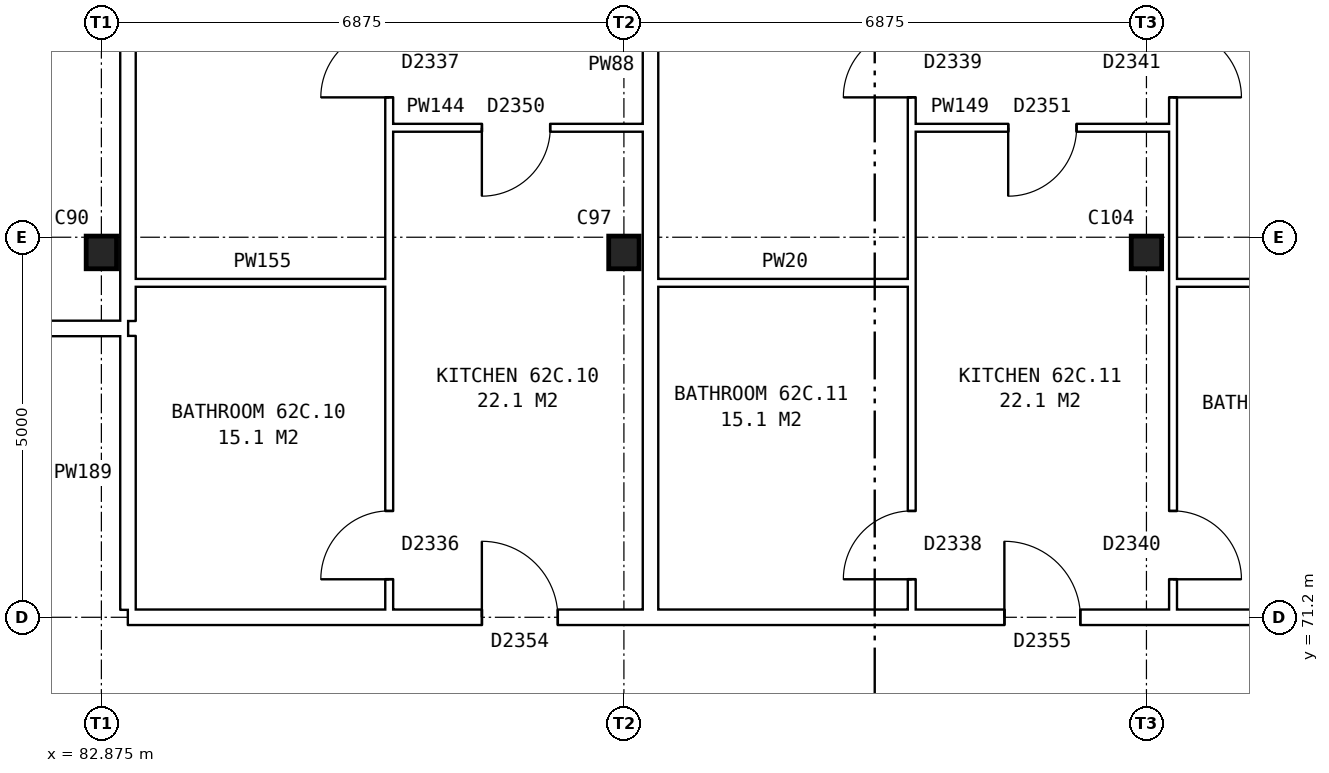
"""IFC4 building model, lengths in metres.
Left out: names, types, materials, properties, quantities, classifications, styles, units other than length and angle.
Written with IfcOpenShell. Run it as: python <this file> out.ifc"""

import sys

from ifc_helpers import new_model, si_unit, direction, frame, frame_2d, origin, origin_2d, place, context, subcontext, project, spatial, rectangle, i_section, extrude, element, fill, save


model = new_model("IFC4")
c1 = context("Model", 3, precision=1e-05, world=origin(), true_north=direction((0.0, 1.0)))
c2 = subcontext(c1, "Body", "Model", "MODEL_VIEW")
j1 = project(units=[si_unit("LENGTHUNIT", "METRE"), si_unit("PLANEANGLEUNIT", "RADIAN")], contexts=[c1])
p1 = place(None, origin())
s1 = spatial("IfcSite", under=j1, at=p1, CompositionType="ELEMENT")
p2 = place(p1, origin())
s2 = spatial("IfcBuilding", under=s1, at=p2, CompositionType="ELEMENT")
p3 = place(p2, frame((0.0, 0.0, 221.4)))
s3 = spatial("IfcBuildingStorey", under=s2, at=p3, CompositionType="ELEMENT", Elevation=221.4)
for number, where, z_axis, x_axis in (
    (1, (82.875, 76.0, 0.0), (0.0, 0.0, 1.0), (1.0, 0.0, 0.0)),
    (2, (89.75, 76.0, 0.0), (0.0, 0.0, 1.0), (1.0, 0.0, 0.0)),
    (3, (96.625, 76.0, 0.0), (0.0, 0.0, 1.0), (1.0, 0.0, 0.0)),
):
    element("IfcColumn", number, at=place(p3, frame(where, z_axis=z_axis, x_axis=x_axis)), inside=s3, PredefinedType="COLUMN", context=c2, shape_type="SweptSolid", body=[
        extrude(i_section(OverallWidth=0.4, OverallDepth=0.43, WebThickness=0.04, FlangeThickness=0.04, at=origin_2d()), origin(), (0.0, 0.0, 1.0), 2.85),
    ])
p4 = place(p3, frame((83.225, 71.2, 0.0), z_axis=(0.0, 0.0, 1.0), x_axis=(1.0, 0.0, 0.0)))
e4 = element("IfcWall", 4, at=p4, inside=s3, PredefinedType="PARTITIONING", context=c2, shape_type="SweptSolid", body=[
    extrude(rectangle(XDim=41.25, YDim=0.2, at=frame_2d((20.625, 0.0))), origin(), (0.0, 0.0, 1.0), 2.85),
])
p5 = place(p4, frame((4.656, 0.0, 0.0)))
e5 = element("IfcOpeningElement", 5, at=p5, cuts=e4, PredefinedType="OPENING", context=c2, shape_type="SweptSolid", body=[
    extrude(rectangle(XDim=1.0, YDim=2.1, at=frame_2d((0.5, 1.05))), frame((0.0, 0.11, 0.0), z_axis=(0.0, -1.0, 0.0), x_axis=(1.0, 0.0, 0.0)), (0.0, 0.0, 1.0), 0.22),
])
p6 = place(p4, frame((11.531, 0.0, 0.0)))
e6 = element("IfcOpeningElement", 6, at=p6, cuts=e4, PredefinedType="OPENING", context=c2, shape_type="SweptSolid", body=[
    extrude(rectangle(XDim=1.0, YDim=2.1, at=frame_2d((0.5, 1.05))), frame((0.0, 0.11, 0.0), z_axis=(0.0, -1.0, 0.0), x_axis=(1.0, 0.0, 0.0)), (0.0, 0.0, 1.0), 0.22),
])
p7 = place(p4, frame((18.406, 0.0, 0.0)))
e7 = element("IfcOpeningElement", 7, at=p7, cuts=e4, PredefinedType="OPENING", context=c2, shape_type="SweptSolid", body=[
    extrude(rectangle(XDim=1.0, YDim=2.1, at=frame_2d((0.5, 1.05))), frame((0.0, 0.11, 0.0), z_axis=(0.0, -1.0, 0.0), x_axis=(1.0, 0.0, 0.0)), (0.0, 0.0, 1.0), 0.22),
])
p8 = place(p4, frame((28.719, 0.0, 0.0)))
e8 = element("IfcOpeningElement", 8, at=p8, cuts=e4, PredefinedType="OPENING", context=c2, shape_type="SweptSolid", body=[
    extrude(rectangle(XDim=1.0, YDim=2.1, at=frame_2d((0.5, 1.05))), frame((0.0, 0.11, 0.0), z_axis=(0.0, -1.0, 0.0), x_axis=(1.0, 0.0, 0.0)), (0.0, 0.0, 1.0), 0.22),
])
p9 = place(p4, frame((35.594, 0.0, 0.0)))
e9 = element("IfcOpeningElement", 9, at=p9, cuts=e4, PredefinedType="OPENING", context=c2, shape_type="SweptSolid", body=[
    extrude(rectangle(XDim=1.0, YDim=2.1, at=frame_2d((0.5, 1.05))), frame((0.0, 0.11, 0.0), z_axis=(0.0, -1.0, 0.0), x_axis=(1.0, 0.0, 0.0)), (0.0, 0.0, 1.0), 0.22),
])
p10 = place(p3, frame((75.64, 75.0, 0.0), z_axis=(0.0, 0.0, 1.0), x_axis=(1.0, 0.0, 0.0)))
e10 = element("IfcWall", 10, at=p10, inside=s3, PredefinedType="PARTITIONING", context=c2, shape_type="SweptSolid", body=[
    extrude(rectangle(XDim=7.585, YDim=0.2, at=frame_2d((3.792, 0.0))), origin(), (0.0, 0.0, 1.0), 2.85),
])
p11 = place(p10, frame((3.343, 0.0, 0.0)))
e11 = element("IfcOpeningElement", 11, at=p11, cuts=e10, PredefinedType="OPENING", context=c2, shape_type="SweptSolid", body=[
    extrude(rectangle(XDim=0.9, YDim=2.1, at=frame_2d((0.45, 1.05))), frame((0.0, 0.11, 0.0), z_axis=(0.0, -1.0, 0.0), x_axis=(1.0, 0.0, 0.0)), (0.0, 0.0, 1.0), 0.22),
])
for number, where, z_axis, x_axis in (
    (12, (83.325, 75.6, 0.0), (0.0, 0.0, 1.0), (1.0, 0.0, 0.0)),
    (13, (90.2, 75.6, 0.0), (0.0, 0.0, 1.0), (1.0, 0.0, 0.0)),
):
    element("IfcWall", number, at=place(p3, frame(where, z_axis=z_axis, x_axis=x_axis)), inside=s3, PredefinedType="PARTITIONING", context=c2, shape_type="SweptSolid", body=[
        extrude(rectangle(XDim=3.337, YDim=0.1, at=frame_2d((1.668, 0.0))), origin(), (0.0, 0.0, 1.0), 2.85),
    ])
p12 = place(p3, frame((96.975, 75.6, 0.0), z_axis=(0.0, 0.0, 1.0), x_axis=(1.0, 0.0, 0.0)))
e14 = element("IfcWall", 14, at=p12, inside=s3, PredefinedType="PARTITIONING", context=c2, shape_type="SweptSolid", body=[
    extrude(rectangle(XDim=3.337, YDim=0.1, at=frame_2d((1.668, 0.0))), origin(), (0.0, 0.0, 1.0), 2.85),
])
p13 = place(p3, frame((86.662, 77.64, 0.0), z_axis=(0.0, 0.0, 1.0), x_axis=(1.0, 0.0, 0.0)))
e15 = element("IfcWall", 15, at=p13, inside=s3, PredefinedType="PARTITIONING", context=c2, shape_type="SweptSolid", body=[
    extrude(rectangle(XDim=3.338, YDim=0.1, at=frame_2d((1.669, 0.0))), origin(), (0.0, 0.0, 1.0), 2.85),
])
p14 = place(p13, frame((1.219, 0.0, 0.0)))
e16 = element("IfcOpeningElement", 16, at=p14, cuts=e15, PredefinedType="OPENING", context=c2, shape_type="SweptSolid", body=[
    extrude(rectangle(XDim=0.9, YDim=2.1, at=frame_2d((0.45, 1.05))), frame((0.0, 0.06, 0.0), z_axis=(0.0, -1.0, 0.0), x_axis=(1.0, 0.0, 0.0)), (0.0, 0.0, 1.0), 0.12),
])
p15 = place(p3, frame((93.537, 77.64, 0.0), z_axis=(0.0, 0.0, 1.0), x_axis=(1.0, 0.0, 0.0)))
e17 = element("IfcWall", 17, at=p15, inside=s3, PredefinedType="PARTITIONING", context=c2, shape_type="SweptSolid", body=[
    extrude(rectangle(XDim=3.438, YDim=0.1, at=frame_2d((1.719, 0.0))), origin(), (0.0, 0.0, 1.0), 2.85),
])
p16 = place(p15, frame((1.269, 0.0, 0.0)))
e18 = element("IfcOpeningElement", 18, at=p16, cuts=e17, PredefinedType="OPENING", context=c2, shape_type="SweptSolid", body=[
    extrude(rectangle(XDim=0.9, YDim=2.1, at=frame_2d((0.45, 1.05))), frame((0.0, 0.06, 0.0), z_axis=(0.0, -1.0, 0.0), x_axis=(1.0, 0.0, 0.0)), (0.0, 0.0, 1.0), 0.12),
])
p17 = place(p3, frame((83.225, 71.3, 0.0), z_axis=(0.0, 0.0, 1.0), x_axis=(0.0, 1.0, 0.0)))
e19 = element("IfcWall", 19, at=p17, inside=s3, PredefinedType="PARTITIONING", context=c2, shape_type="SweptSolid", body=[
    extrude(rectangle(XDim=3.6, YDim=0.2, at=frame_2d((1.8, 0.0))), origin(), (0.0, 0.0, 1.0), 2.85),
])
p18 = place(p3, frame((83.225, 75.1, 0.0), z_axis=(0.0, 0.0, 1.0), x_axis=(0.0, 1.0, 0.0)))
e20 = element("IfcWall", 20, at=p18, inside=s3, PredefinedType="PARTITIONING", context=c2, shape_type="SweptSolid", body=[
    extrude(rectangle(XDim=10.54, YDim=0.2, at=frame_2d((5.27, 0.0))), origin(), (0.0, 0.0, 1.0), 2.85),
])
p19 = place(p3, frame((86.662, 71.3, 0.0), z_axis=(0.0, 0.0, 1.0), x_axis=(0.0, 1.0, 0.0)))
e21 = element("IfcWall", 21, at=p19, inside=s3, PredefinedType="PARTITIONING", context=c2, shape_type="SweptSolid", body=[
    extrude(rectangle(XDim=14.34, YDim=0.1, at=frame_2d((7.17, 0.0))), origin(), (0.0, 0.0, 1.0), 2.85),
])
p20 = place(p19, frame((6.74, 0.0, 0.0)))
e22 = element("IfcOpeningElement", 22, at=p20, cuts=e21, PredefinedType="OPENING", context=c2, shape_type="SweptSolid", body=[
    extrude(rectangle(XDim=0.9, YDim=2.1, at=frame_2d((0.45, 1.05))), frame((0.0, 0.06, 0.0), z_axis=(0.0, -1.0, 0.0), x_axis=(1.0, 0.0, 0.0)), (0.0, 0.0, 1.0), 0.12),
])
p21 = place(p19, frame((0.4, 0.0, 0.0)))
e23 = element("IfcOpeningElement", 23, at=p21, cuts=e21, PredefinedType="OPENING", context=c2, shape_type="SweptSolid", body=[
    extrude(rectangle(XDim=0.9, YDim=2.1, at=frame_2d((0.45, 1.05))), frame((0.0, 0.06, 0.0), z_axis=(0.0, -1.0, 0.0), x_axis=(1.0, 0.0, 0.0)), (0.0, 0.0, 1.0), 0.12),
])
p22 = place(p3, frame((90.1, 71.3, 0.0), z_axis=(0.0, 0.0, 1.0), x_axis=(0.0, 1.0, 0.0)))
e24 = element("IfcWall", 24, at=p22, inside=s3, PredefinedType="PARTITIONING", context=c2, shape_type="SweptSolid", body=[
    extrude(rectangle(XDim=14.34, YDim=0.2, at=frame_2d((7.17, 0.0))), origin(), (0.0, 0.0, 1.0), 2.85),
])
p23 = place(p3, frame((93.537, 71.3, 0.0), z_axis=(0.0, 0.0, 1.0), x_axis=(0.0, 1.0, 0.0)))
e25 = element("IfcWall", 25, at=p23, inside=s3, PredefinedType="PARTITIONING", context=c2, shape_type="SweptSolid", body=[
    extrude(rectangle(XDim=14.34, YDim=0.1, at=frame_2d((7.17, 0.0))), origin(), (0.0, 0.0, 1.0), 2.85),
])
p24 = place(p23, frame((6.74, 0.0, 0.0)))
e26 = element("IfcOpeningElement", 26, at=p24, cuts=e25, PredefinedType="OPENING", context=c2, shape_type="SweptSolid", body=[
    extrude(rectangle(XDim=0.9, YDim=2.1, at=frame_2d((0.45, 1.05))), frame((0.0, 0.06, 0.0), z_axis=(0.0, -1.0, 0.0), x_axis=(1.0, 0.0, 0.0)), (0.0, 0.0, 1.0), 0.12),
])
p25 = place(p23, frame((0.4, 0.0, 0.0)))
e27 = element("IfcOpeningElement", 27, at=p25, cuts=e25, PredefinedType="OPENING", context=c2, shape_type="SweptSolid", body=[
    extrude(rectangle(XDim=0.9, YDim=2.1, at=frame_2d((0.45, 1.05))), frame((0.0, 0.06, 0.0), z_axis=(0.0, -1.0, 0.0), x_axis=(1.0, 0.0, 0.0)), (0.0, 0.0, 1.0), 0.12),
])
p26 = place(p3, frame((96.975, 71.3, 0.0), z_axis=(0.0, 0.0, 1.0), x_axis=(0.0, 1.0, 0.0)))
e28 = element("IfcWall", 28, at=p26, inside=s3, PredefinedType="PARTITIONING", context=c2, shape_type="SweptSolid", body=[
    extrude(rectangle(XDim=14.34, YDim=0.1, at=frame_2d((7.17, 0.0))), origin(), (0.0, 0.0, 1.0), 2.85),
])
p27 = place(p26, frame((6.74, 0.0, 0.0)))
e29 = element("IfcOpeningElement", 29, at=p27, cuts=e28, PredefinedType="OPENING", context=c2, shape_type="SweptSolid", body=[
    extrude(rectangle(XDim=0.9, YDim=2.1, at=frame_2d((0.45, 1.05))), frame((0.0, 0.06, 0.0), z_axis=(0.0, -1.0, 0.0), x_axis=(1.0, 0.0, 0.0)), (0.0, 0.0, 1.0), 0.12),
])
p28 = place(p26, frame((0.4, 0.0, 0.0)))
e30 = element("IfcOpeningElement", 30, at=p28, cuts=e28, PredefinedType="OPENING", context=c2, shape_type="SweptSolid", body=[
    extrude(rectangle(XDim=0.9, YDim=2.1, at=frame_2d((0.45, 1.05))), frame((0.0, 0.06, 0.0), z_axis=(0.0, -1.0, 0.0), x_axis=(1.0, 0.0, 0.0)), (0.0, 0.0, 1.0), 0.12),
])
p29 = place(p20, origin())
e31 = element("IfcDoor", 31, at=p29, inside=s3, OperationType="SINGLE_SWING_LEFT", PredefinedType="DOOR", context=c2, shape_type="SweptSolid", body=[
    extrude(rectangle(XDim=0.9, YDim=2.1, at=frame_2d((0.45, 1.05))), frame((0.0, 0.025, 0.0), z_axis=(0.0, -1.0, 0.0), x_axis=(1.0, 0.0, 0.0)), (0.0, 0.0, 1.0), 0.05),
])
fill(e22, e31)
p30 = place(p5, origin())
e32 = element("IfcDoor", 32, at=p30, inside=s3, OperationType="SINGLE_SWING_LEFT", PredefinedType="DOOR", context=c2, shape_type="SweptSolid", body=[
    extrude(rectangle(XDim=1.0, YDim=2.1, at=frame_2d((0.5, 1.05))), frame((0.0, 0.025, 0.0), z_axis=(0.0, -1.0, 0.0), x_axis=(1.0, 0.0, 0.0)), (0.0, 0.0, 1.0), 0.05),
])
fill(e5, e32)
p31 = place(p14, frame((0.9, 0.0, 0.0), z_axis=(0.0, 0.0, 1.0), x_axis=(-1.0, 0.0, 0.0)))
e33 = element("IfcDoor", 33, at=p31, inside=s3, OperationType="SINGLE_SWING_RIGHT", PredefinedType="DOOR", context=c2, shape_type="SweptSolid", body=[
    extrude(rectangle(XDim=0.9, YDim=2.1, at=frame_2d((0.45, 1.05))), frame((0.0, 0.025, 0.0), z_axis=(0.0, -1.0, 0.0), x_axis=(1.0, 0.0, 0.0)), (0.0, 0.0, 1.0), 0.05),
])
fill(e16, e33)
p32 = place(p21, origin())
e34 = element("IfcDoor", 34, at=p32, inside=s3, OperationType="SINGLE_SWING_LEFT", PredefinedType="DOOR", context=c2, shape_type="SweptSolid", body=[
    extrude(rectangle(XDim=0.9, YDim=2.1, at=frame_2d((0.45, 1.05))), frame((0.0, 0.025, 0.0), z_axis=(0.0, -1.0, 0.0), x_axis=(1.0, 0.0, 0.0)), (0.0, 0.0, 1.0), 0.05),
])
fill(e23, e34)
p33 = place(p24, origin())
e35 = element("IfcDoor", 35, at=p33, inside=s3, OperationType="SINGLE_SWING_LEFT", PredefinedType="DOOR", context=c2, shape_type="SweptSolid", body=[
    extrude(rectangle(XDim=0.9, YDim=2.1, at=frame_2d((0.45, 1.05))), frame((0.0, 0.025, 0.0), z_axis=(0.0, -1.0, 0.0), x_axis=(1.0, 0.0, 0.0)), (0.0, 0.0, 1.0), 0.05),
])
fill(e26, e35)
p34 = place(p27, frame((0.9, 0.0, 0.0), z_axis=(0.0, 0.0, 1.0), x_axis=(-1.0, 0.0, 0.0)))
e36 = element("IfcDoor", 36, at=p34, inside=s3, OperationType="SINGLE_SWING_RIGHT", PredefinedType="DOOR", context=c2, shape_type="SweptSolid", body=[
    extrude(rectangle(XDim=0.9, YDim=2.1, at=frame_2d((0.45, 1.05))), frame((0.0, 0.025, 0.0), z_axis=(0.0, -1.0, 0.0), x_axis=(1.0, 0.0, 0.0)), (0.0, 0.0, 1.0), 0.05),
])
fill(e29, e36)
p35 = place(p6, origin())
e37 = element("IfcDoor", 37, at=p35, inside=s3, OperationType="SINGLE_SWING_LEFT", PredefinedType="DOOR", context=c2, shape_type="SweptSolid", body=[
    extrude(rectangle(XDim=1.0, YDim=2.1, at=frame_2d((0.5, 1.05))), frame((0.0, 0.025, 0.0), z_axis=(0.0, -1.0, 0.0), x_axis=(1.0, 0.0, 0.0)), (0.0, 0.0, 1.0), 0.05),
])
fill(e6, e37)
p36 = place(p16, frame((0.9, 0.0, 0.0), z_axis=(0.0, 0.0, 1.0), x_axis=(-1.0, 0.0, 0.0)))
e38 = element("IfcDoor", 38, at=p36, inside=s3, OperationType="SINGLE_SWING_RIGHT", PredefinedType="DOOR", context=c2, shape_type="SweptSolid", body=[
    extrude(rectangle(XDim=0.9, YDim=2.1, at=frame_2d((0.45, 1.05))), frame((0.0, 0.025, 0.0), z_axis=(0.0, -1.0, 0.0), x_axis=(1.0, 0.0, 0.0)), (0.0, 0.0, 1.0), 0.05),
])
fill(e18, e38)
p37 = place(p25, origin())
e39 = element("IfcDoor", 39, at=p37, inside=s3, OperationType="SINGLE_SWING_LEFT", PredefinedType="DOOR", context=c2, shape_type="SweptSolid", body=[
    extrude(rectangle(XDim=0.9, YDim=2.1, at=frame_2d((0.45, 1.05))), frame((0.0, 0.025, 0.0), z_axis=(0.0, -1.0, 0.0), x_axis=(1.0, 0.0, 0.0)), (0.0, 0.0, 1.0), 0.05),
])
fill(e27, e39)
p38 = place(p28, frame((0.9, 0.0, 0.0), z_axis=(0.0, 0.0, 1.0), x_axis=(-1.0, 0.0, 0.0)))
e40 = element("IfcDoor", 40, at=p38, inside=s3, OperationType="SINGLE_SWING_RIGHT", PredefinedType="DOOR", context=c2, shape_type="SweptSolid", body=[
    extrude(rectangle(XDim=0.9, YDim=2.1, at=frame_2d((0.45, 1.05))), frame((0.0, 0.025, 0.0), z_axis=(0.0, -1.0, 0.0), x_axis=(1.0, 0.0, 0.0)), (0.0, 0.0, 1.0), 0.05),
])
fill(e30, e40)
save(model, sys.argv[1])
